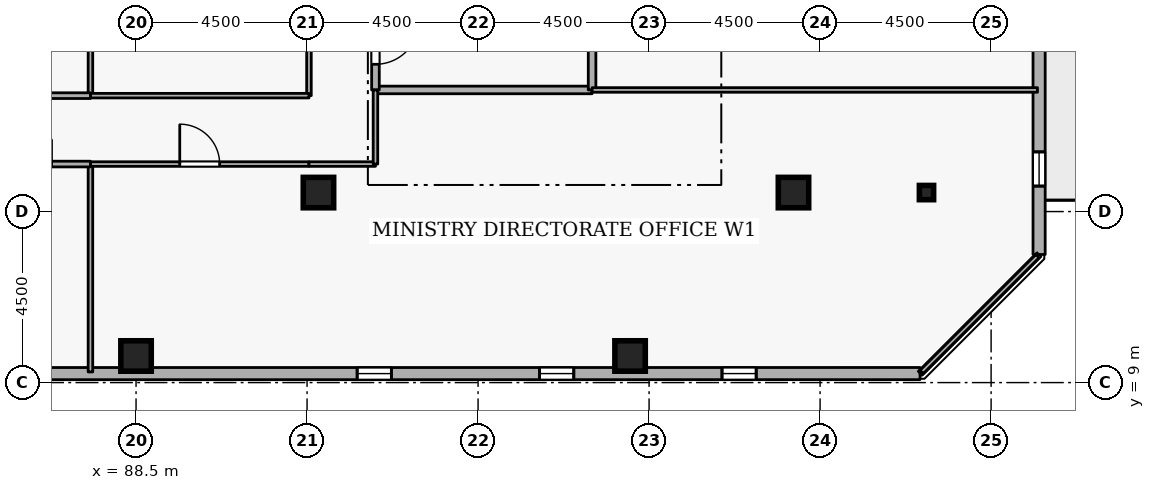
"""IFC4 building model, lengths in metres.
Left out: names, types, materials, properties, quantities, classifications, styles, units other than length and angle.
Written with IfcOpenShell. Run it as: python <this file> out.ifc"""

import sys

from ifc_helpers import new_model, si_unit, direction, frame, frame_2d, origin, origin_2d, place, context, subcontext, project, spatial, rectangle, i_section, extrude, element, fill, save


model = new_model("IFC4")
c1 = context("Model", 3, precision=1e-05, world=origin(), true_north=direction((0.0, 1.0)))
c2 = subcontext(c1, "Body", "Model", "MODEL_VIEW")
j1 = project(units=[si_unit("LENGTHUNIT", "METRE"), si_unit("PLANEANGLEUNIT", "RADIAN")], contexts=[c1])
p1 = place(None, origin())
s1 = spatial("IfcSite", under=j1, at=p1, CompositionType="ELEMENT")
p2 = place(p1, origin())
s2 = spatial("IfcBuilding", under=s1, at=p2, CompositionType="ELEMENT")
p3 = place(p2, frame((0.0, 0.0, 269.1)))
s3 = spatial("IfcBuildingStorey", under=s2, at=p3, CompositionType="ELEMENT", Elevation=269.1)
for number, where, z_axis, x_axis in (
    (1, (105.8, 14.0, 0.0), (0.0, 0.0, 1.0), (1.0, 0.0, 0.0)),
    (2, (101.5, 9.7, 0.0), (0.0, 0.0, 1.0), (1.0, 0.0, 0.0)),
    (3, (88.5, 9.7, 0.0), (0.0, 0.0, 1.0), (1.0, 0.0, 0.0)),
    (4, (93.3, 14.0, 0.0), (0.0, 0.0, 1.0), (1.0, 0.0, 0.0)),
):
    element("IfcColumn", number, at=place(p3, frame(where, z_axis=z_axis, x_axis=x_axis)), inside=s3, PredefinedType="COLUMN", context=c2, shape_type="SweptSolid", body=[
        extrude(rectangle(XDim=0.8, YDim=0.8, at=origin_2d()), origin(), (0.0, 0.0, 1.0), 3.6),
    ])
p4 = place(p3, frame((109.3, 14.0, 0.0), z_axis=(0.0, 0.0, 1.0), x_axis=(1.0, 0.0, 0.0)))
e5 = element("IfcColumn", 5, at=p4, inside=s3, PredefinedType="COLUMN", context=c2, shape_type="SweptSolid", body=[
    extrude(i_section(OverallWidth=0.375, OverallDepth=0.375, WebThickness=0.017, FlangeThickness=0.027, FilletRadius=0.015, at=origin_2d()), origin(), (0.0, 0.0, 1.0), 3.6),
])
p5 = place(p3, frame((73.319, 9.235, 0.0), z_axis=(0.0, 0.0, 1.0), x_axis=(0.999999998513, 5.4540124e-05, 0.0)))
e6 = element("IfcWall", 6, at=p5, inside=s3, PredefinedType="STANDARD", context=c2, shape_type="SweptSolid", body=[
    extrude(rectangle(XDim=35.811, YDim=0.32, at=frame_2d((17.905, 0.0))), origin(), (0.0, 0.0, 1.0), 2.7),
])
p6 = place(p5, frame((6.6, 0.0, 0.72)))
e7 = element("IfcOpeningElement", 7, at=p6, cuts=e6, PredefinedType="OPENING", context=c2, shape_type="SweptSolid", body=[
    extrude(rectangle(XDim=0.9, YDim=1.75, at=frame_2d((0.45, 0.875))), frame((0.0, 0.17, 0.0), z_axis=(0.0, -1.0, 0.0), x_axis=(1.0, 0.0, 0.0)), (0.0, 0.0, 1.0), 0.34),
])
p7 = place(p5, frame((11.4, 0.0, 0.72)))
e8 = element("IfcOpeningElement", 8, at=p7, cuts=e6, PredefinedType="OPENING", context=c2, shape_type="SweptSolid", body=[
    extrude(rectangle(XDim=0.9, YDim=1.75, at=frame_2d((0.45, 0.875))), frame((0.0, 0.17, 0.0), z_axis=(0.0, -1.0, 0.0), x_axis=(1.0, 0.0, 0.0)), (0.0, 0.0, 1.0), 0.34),
])
p8 = place(p5, frame((21.0, 0.0, 0.72)))
e9 = element("IfcOpeningElement", 9, at=p8, cuts=e6, PredefinedType="OPENING", context=c2, shape_type="SweptSolid", body=[
    extrude(rectangle(XDim=0.9, YDim=1.75, at=frame_2d((0.45, 0.875))), frame((0.0, 0.17, 0.0), z_axis=(0.0, -1.0, 0.0), x_axis=(1.0, 0.0, 0.0)), (0.0, 0.0, 1.0), 0.34),
])
p9 = place(p5, frame((25.8, 0.0, 0.72)))
e10 = element("IfcOpeningElement", 10, at=p9, cuts=e6, PredefinedType="OPENING", context=c2, shape_type="SweptSolid", body=[
    extrude(rectangle(XDim=0.9, YDim=1.75, at=frame_2d((0.45, 0.875))), frame((0.0, 0.17, 0.0), z_axis=(0.0, -1.0, 0.0), x_axis=(1.0, 0.0, 0.0)), (0.0, 0.0, 1.0), 0.34),
])
p10 = place(p5, frame((30.6, 0.0, 0.72)))
e11 = element("IfcOpeningElement", 11, at=p10, cuts=e6, PredefinedType="OPENING", context=c2, shape_type="SweptSolid", body=[
    extrude(rectangle(XDim=0.9, YDim=1.75, at=frame_2d((0.45, 0.875))), frame((0.0, 0.17, 0.0), z_axis=(0.0, -1.0, 0.0), x_axis=(1.0, 0.0, 0.0)), (0.0, 0.0, 1.0), 0.34),
])
p11 = place(p3, frame((112.263, 12.371, 0.0), z_axis=(0.0, 0.0, 1.0), x_axis=(5.4540124e-05, 0.999999998513, 0.0)))
e12 = element("IfcWall", 12, at=p11, inside=s3, PredefinedType="STANDARD", context=c2, shape_type="SweptSolid", body=[
    extrude(rectangle(XDim=35.811, YDim=0.32, at=frame_2d((17.905, 0.0))), origin(), (0.0, 0.0, 1.0), 2.7),
])
p12 = place(p11, frame((22.855, 0.0, 0.0)))
e13 = element("IfcOpeningElement", 13, at=p12, cuts=e12, PredefinedType="OPENING", context=c2, shape_type="SweptSolid", body=[
    extrude(rectangle(XDim=1.0, YDim=2.08, at=frame_2d((0.5, 1.04))), frame((0.0, 0.17, 0.0), z_axis=(0.0, -1.0, 0.0), x_axis=(1.0, 0.0, 0.0)), (0.0, 0.0, 1.0), 0.34),
])
p13 = place(p11, frame((1.8, 0.0, 0.72)))
e14 = element("IfcOpeningElement", 14, at=p13, cuts=e12, PredefinedType="OPENING", context=c2, shape_type="SweptSolid", body=[
    extrude(rectangle(XDim=0.9, YDim=1.75, at=frame_2d((0.45, 0.875))), frame((0.0, 0.17, 0.0), z_axis=(0.0, -1.0, 0.0), x_axis=(1.0, 0.0, 0.0)), (0.0, 0.0, 1.0), 0.34),
])
p14 = place(p11, frame((6.6, 0.0, 0.72)))
e15 = element("IfcOpeningElement", 15, at=p14, cuts=e12, PredefinedType="OPENING", context=c2, shape_type="SweptSolid", body=[
    extrude(rectangle(XDim=0.9, YDim=1.75, at=frame_2d((0.45, 0.875))), frame((0.0, 0.17, 0.0), z_axis=(0.0, -1.0, 0.0), x_axis=(1.0, 0.0, 0.0)), (0.0, 0.0, 1.0), 0.34),
])
p15 = place(p11, frame((11.4, 0.0, 0.72)))
e16 = element("IfcOpeningElement", 16, at=p15, cuts=e12, PredefinedType="OPENING", context=c2, shape_type="SweptSolid", body=[
    extrude(rectangle(XDim=0.9, YDim=1.75, at=frame_2d((0.45, 0.875))), frame((0.0, 0.17, 0.0), z_axis=(0.0, -1.0, 0.0), x_axis=(1.0, 0.0, 0.0)), (0.0, 0.0, 1.0), 0.34),
])
p16 = place(p11, frame((16.2, 0.0, 0.72)))
e17 = element("IfcOpeningElement", 17, at=p16, cuts=e12, PredefinedType="OPENING", context=c2, shape_type="SweptSolid", body=[
    extrude(rectangle(XDim=0.9, YDim=1.75, at=frame_2d((0.45, 0.875))), frame((0.0, 0.17, 0.0), z_axis=(0.0, -1.0, 0.0), x_axis=(1.0, 0.0, 0.0)), (0.0, 0.0, 1.0), 0.34),
])
p17 = place(p11, frame((21.0, 0.0, 0.72)))
e18 = element("IfcOpeningElement", 18, at=p17, cuts=e12, PredefinedType="OPENING", context=c2, shape_type="SweptSolid", body=[
    extrude(rectangle(XDim=0.9, YDim=1.75, at=frame_2d((0.45, 0.875))), frame((0.0, 0.17, 0.0), z_axis=(0.0, -1.0, 0.0), x_axis=(1.0, 0.0, 0.0)), (0.0, 0.0, 1.0), 0.34),
])
p18 = place(p11, frame((25.8, 0.0, 0.72)))
e19 = element("IfcOpeningElement", 19, at=p18, cuts=e12, PredefinedType="OPENING", context=c2, shape_type="SweptSolid", body=[
    extrude(rectangle(XDim=0.9, YDim=1.75, at=frame_2d((0.45, 0.875))), frame((0.0, 0.17, 0.0), z_axis=(0.0, -1.0, 0.0), x_axis=(1.0, 0.0, 0.0)), (0.0, 0.0, 1.0), 0.34),
])
p19 = place(p11, frame((30.6, 0.0, 0.72)))
e20 = element("IfcOpeningElement", 20, at=p19, cuts=e12, PredefinedType="OPENING", context=c2, shape_type="SweptSolid", body=[
    extrude(rectangle(XDim=0.9, YDim=1.75, at=frame_2d((0.45, 0.875))), frame((0.0, 0.17, 0.0), z_axis=(0.0, -1.0, 0.0), x_axis=(1.0, 0.0, 0.0)), (0.0, 0.0, 1.0), 0.34),
])
p20 = place(p3, frame((94.8, 16.7, 0.0), z_axis=(0.0, 0.0, 1.0), x_axis=(1.0, 0.0, 0.0)))
e21 = element("IfcWall", 21, at=p20, inside=s3, PredefinedType="STANDARD", context=c2, shape_type="SweptSolid", body=[
    extrude(rectangle(XDim=5.7, YDim=0.2, at=frame_2d((2.85, 0.0))), origin(), (0.0, 0.0, 1.0), 3.34),
])
p21 = place(p3, frame((100.5, 16.7, 0.0), z_axis=(0.0, 0.0, 1.0), x_axis=(0.0, 1.0, 0.0)))
e22 = element("IfcWall", 22, at=p21, inside=s3, PredefinedType="STANDARD", context=c2, shape_type="SweptSolid", body=[
    extrude(rectangle(XDim=2.5, YDim=0.2, at=frame_2d((1.25, 0.0))), origin(), (0.0, 0.0, 1.0), 3.34),
])
p22 = place(p3, frame((94.8, 19.2, 0.0), z_axis=(0.0, 0.0, 1.0), x_axis=(0.0, -1.0, 0.0)))
e23 = element("IfcWall", 23, at=p22, inside=s3, PredefinedType="STANDARD", context=c2, shape_type="SweptSolid", body=[
    extrude(rectangle(XDim=2.5, YDim=0.2, at=frame_2d((1.25, 0.0))), origin(), (0.0, 0.0, 1.0), 3.34),
])
p23 = place(p22, frame((0.675, 0.0, 0.0)))
e24 = element("IfcOpeningElement", 24, at=p23, cuts=e23, PredefinedType="OPENING", context=c2, shape_type="SweptSolid", body=[
    extrude(rectangle(XDim=1.15, YDim=2.1, at=frame_2d((0.575, 1.05))), frame((0.0, 0.11, 0.0), z_axis=(0.0, -1.0, 0.0), x_axis=(1.0, 0.0, 0.0)), (0.0, 0.0, 1.0), 0.22),
])
p24 = place(p3, frame((87.3, 9.28, 0.0), z_axis=(0.0, 0.0, 1.0), x_axis=(0.0, 1.0, 0.0)))
e25 = element("IfcWall", 25, at=p24, inside=s3, PredefinedType="PARTITIONING", context=c2, shape_type="SweptSolid", body=[
    extrude(rectangle(XDim=5.47, YDim=0.12, at=frame_2d((2.735, 0.0))), origin(), (0.0, 0.0, 1.0), 3.34),
])
p25 = place(p3, frame((87.3, 14.75, 0.0), z_axis=(0.0, 0.0, 1.0), x_axis=(1.0, 0.0, 0.0)))
e26 = element("IfcWall", 26, at=p25, inside=s3, PredefinedType="PARTITIONING", context=c2, shape_type="SweptSolid", body=[
    extrude(rectangle(XDim=5.75, YDim=0.12, at=frame_2d((2.875, 0.0))), origin(), (0.0, 0.0, 1.0), 3.34),
])
p26 = place(p25, frame((2.35, 0.0, 0.0)))
e27 = element("IfcOpeningElement", 27, at=p26, cuts=e26, PredefinedType="OPENING", context=c2, shape_type="SweptSolid", body=[
    extrude(rectangle(XDim=1.05, YDim=2.1, at=frame_2d((0.525, 1.05))), frame((0.0, 0.07, 0.0), z_axis=(0.0, -1.0, 0.0), x_axis=(1.0, 0.0, 0.0)), (0.0, 0.0, 1.0), 0.14),
])
p27 = place(p3, frame((93.05, 14.75, 0.0), z_axis=(0.0, 0.0, 1.0), x_axis=(1.0, 0.0, 0.0)))
e28 = element("IfcWall", 28, at=p27, inside=s3, PredefinedType="PARTITIONING", context=c2, shape_type="SweptSolid", body=[
    extrude(rectangle(XDim=1.75, YDim=0.12, at=frame_2d((0.875, 0.0))), origin(), (0.0, 0.0, 1.0), 3.34),
])
p28 = place(p3, frame((94.8, 14.75, 0.0), z_axis=(0.0, 0.0, 1.0), x_axis=(0.0, 1.0, 0.0)))
e29 = element("IfcWall", 29, at=p28, inside=s3, PredefinedType="PARTITIONING", context=c2, shape_type="SweptSolid", body=[
    extrude(rectangle(XDim=1.95, YDim=0.12, at=frame_2d((0.975, 0.0))), origin(), (0.0, 0.0, 1.0), 3.34),
])
p29 = place(p3, frame((100.5, 16.7, 0.0), z_axis=(0.0, 0.0, 1.0), x_axis=(1.0, 0.0, 0.0)))
e30 = element("IfcWall", 30, at=p29, inside=s3, PredefinedType="PARTITIONING", context=c2, shape_type="SweptSolid", body=[
    extrude(rectangle(XDim=11.72, YDim=0.12, at=frame_2d((5.86, 0.0))), origin(), (0.0, 0.0, 1.0), 3.34),
])
p30 = place(p3, frame((112.22, 12.329, 0.0), z_axis=(0.0, 0.0, 1.0), x_axis=(-0.707106781187, -0.707106781187, 0.0)))
e31 = element("IfcWall", 31, at=p30, inside=s3, PredefinedType="PARTITIONING", context=c2, shape_type="SweptSolid", body=[
    extrude(rectangle(XDim=4.311, YDim=0.12, at=frame_2d((2.156, 0.0))), origin(), (0.0, 0.0, 1.0), 3.34),
])
p31 = place(p3, frame((83.95, 14.75, 0.0), z_axis=(0.0, 0.0, 1.0), x_axis=(1.0, 0.0, 0.0)))
e32 = element("IfcWall", 32, at=p31, inside=s3, PredefinedType="PARTITIONING", context=c2, shape_type="SweptSolid", body=[
    extrude(rectangle(XDim=3.35, YDim=0.15, at=frame_2d((1.675, 0.0))), origin(), (0.0, 0.0, 1.0), 3.34),
])
p32 = place(p31, frame((1.025, 0.0, 0.0)))
e33 = element("IfcOpeningElement", 33, at=p32, cuts=e32, PredefinedType="OPENING", context=c2, shape_type="SweptSolid", body=[
    extrude(rectangle(XDim=1.3, YDim=2.12, at=frame_2d((0.65, 1.06))), frame((0.0, 0.085, 0.0), z_axis=(0.0, -1.0, 0.0), x_axis=(1.0, 0.0, 0.0)), (0.0, 0.0, 1.0), 0.17),
])
p33 = place(p3, frame((87.3, 16.55, 0.0), z_axis=(0.0, 0.0, 1.0), x_axis=(0.0, 1.0, 0.0)))
e34 = element("IfcWall", 34, at=p33, inside=s3, PredefinedType="PARTITIONING", context=c2, shape_type="SweptSolid", body=[
    extrude(rectangle(XDim=5.85, YDim=0.12, at=frame_2d((2.925, 0.0))), origin(), (0.0, 0.0, 1.0), 3.34),
])
p34 = place(p3, frame((93.05, 22.4, 0.0), z_axis=(0.0, 0.0, 1.0), x_axis=(0.0, -1.0, 0.0)))
e35 = element("IfcWall", 35, at=p34, inside=s3, PredefinedType="PARTITIONING", context=c2, shape_type="SweptSolid", body=[
    extrude(rectangle(XDim=5.85, YDim=0.12, at=frame_2d((2.925, 0.0))), origin(), (0.0, 0.0, 1.0), 3.34),
])
p35 = place(p34, frame((2.45, 0.0, 0.0)))
e36 = element("IfcOpeningElement", 36, at=p35, cuts=e35, PredefinedType="OPENING", context=c2, shape_type="SweptSolid", body=[
    extrude(rectangle(XDim=0.95, YDim=2.1, at=frame_2d((0.475, 1.05))), frame((0.0, 0.07, 0.0), z_axis=(0.0, -1.0, 0.0), x_axis=(1.0, 0.0, 0.0)), (0.0, 0.0, 1.0), 0.14),
])
p36 = place(p3, frame((93.05, 16.55, 0.0), z_axis=(0.0, 0.0, 1.0), x_axis=(-1.0, 0.0, 0.0)))
e37 = element("IfcWall", 37, at=p36, inside=s3, PredefinedType="PARTITIONING", context=c2, shape_type="SweptSolid", body=[
    extrude(rectangle(XDim=5.75, YDim=0.12, at=frame_2d((2.875, 0.0))), origin(), (0.0, 0.0, 1.0), 3.34),
])
p37 = place(p3, frame((87.3, 16.55, 0.0), z_axis=(0.0, 0.0, 1.0), x_axis=(-1.0, 0.0, 0.0)))
e38 = element("IfcWall", 38, at=p37, inside=s3, PredefinedType="PARTITIONING", context=c2, shape_type="SweptSolid", body=[
    extrude(rectangle(XDim=3.35, YDim=0.15, at=frame_2d((1.675, 0.0))), origin(), (0.0, 0.0, 1.0), 3.34),
])
p38 = place(p8, origin())
e39 = element("IfcWindow", 39, at=p38, inside=s3, PartitioningType="SINGLE_PANEL", PredefinedType="WINDOW", context=c2, shape_type="SweptSolid", body=[
    extrude(rectangle(XDim=0.9, YDim=1.75, at=frame_2d((0.45, 0.875))), frame((0.0, 0.03, 0.0), z_axis=(0.0, -1.0, 0.0), x_axis=(1.0, 0.0, 0.0)), (0.0, 0.0, 1.0), 0.06),
])
fill(e9, e39)
p39 = place(p9, origin())
e40 = element("IfcWindow", 40, at=p39, inside=s3, PartitioningType="SINGLE_PANEL", PredefinedType="WINDOW", context=c2, shape_type="SweptSolid", body=[
    extrude(rectangle(XDim=0.9, YDim=1.75, at=frame_2d((0.45, 0.875))), frame((0.0, 0.03, 0.0), z_axis=(0.0, -1.0, 0.0), x_axis=(1.0, 0.0, 0.0)), (0.0, 0.0, 1.0), 0.06),
])
fill(e10, e40)
p40 = place(p10, origin())
e41 = element("IfcWindow", 41, at=p40, inside=s3, PartitioningType="SINGLE_PANEL", PredefinedType="WINDOW", context=c2, shape_type="SweptSolid", body=[
    extrude(rectangle(XDim=0.9, YDim=1.75, at=frame_2d((0.45, 0.875))), frame((0.0, 0.03, 0.0), z_axis=(0.0, -1.0, 0.0), x_axis=(1.0, 0.0, 0.0)), (0.0, 0.0, 1.0), 0.06),
])
fill(e11, e41)
p41 = place(p13, origin())
e42 = element("IfcWindow", 42, at=p41, inside=s3, PartitioningType="SINGLE_PANEL", PredefinedType="WINDOW", context=c2, shape_type="SweptSolid", body=[
    extrude(rectangle(XDim=0.9, YDim=1.75, at=frame_2d((0.45, 0.875))), frame((0.0, 0.03, 0.0), z_axis=(0.0, -1.0, 0.0), x_axis=(1.0, 0.0, 0.0)), (0.0, 0.0, 1.0), 0.06),
])
fill(e14, e42)
p42 = place(p23, origin())
e43 = element("IfcDoor", 43, at=p42, inside=s3, OperationType="SINGLE_SWING_LEFT", PredefinedType="DOOR", context=c2, shape_type="SweptSolid", body=[
    extrude(rectangle(XDim=1.15, YDim=2.1, at=frame_2d((0.575, 1.05))), frame((0.0, 0.025, 0.0), z_axis=(0.0, -1.0, 0.0), x_axis=(1.0, 0.0, 0.0)), (0.0, 0.0, 1.0), 0.05),
])
fill(e24, e43)
p43 = place(p26, origin())
e44 = element("IfcDoor", 44, at=p43, inside=s3, OperationType="SINGLE_SWING_LEFT", PredefinedType="DOOR", context=c2, shape_type="SweptSolid", body=[
    extrude(rectangle(XDim=1.05, YDim=2.1, at=frame_2d((0.525, 1.05))), frame((0.0, 0.025, 0.0), z_axis=(0.0, -1.0, 0.0), x_axis=(1.0, 0.0, 0.0)), (0.0, 0.0, 1.0), 0.05),
])
fill(e27, e44)
save(model, sys.argv[1])
